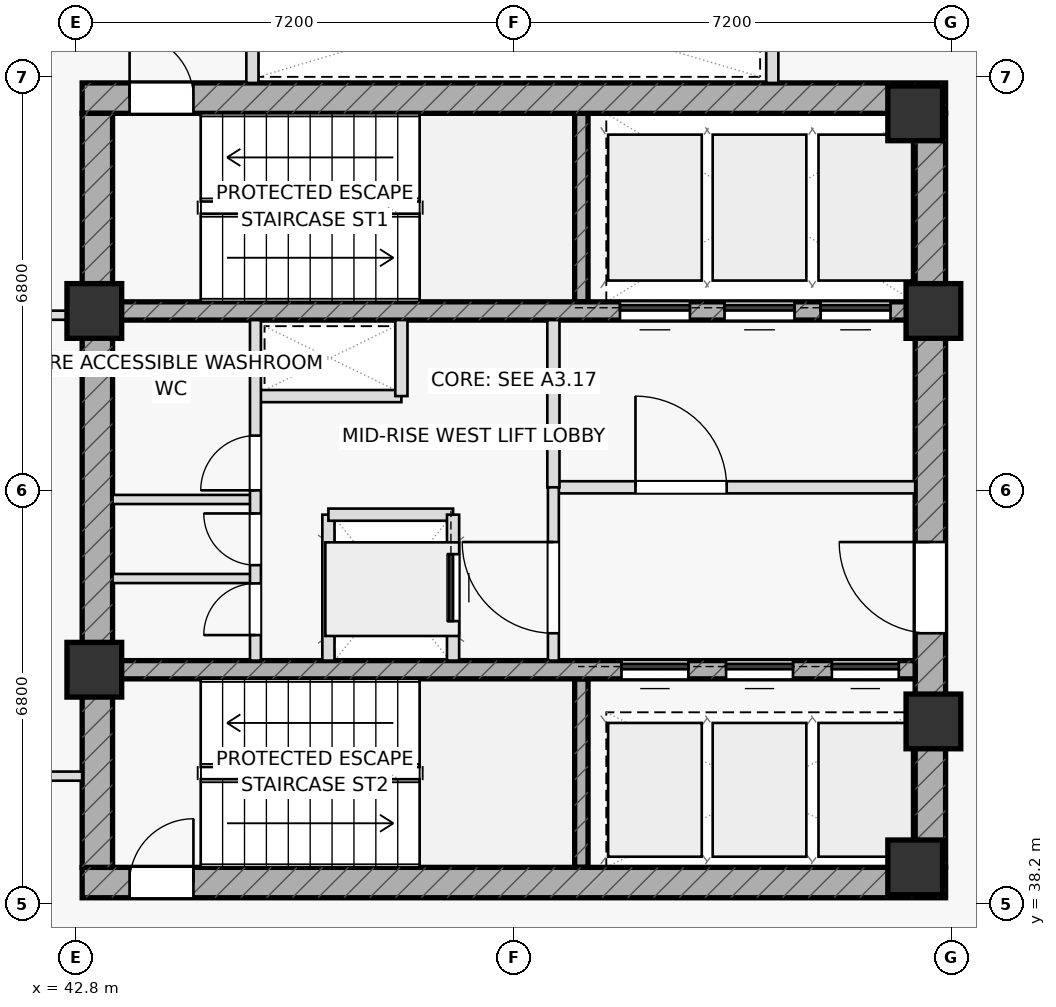
"""IFC4 building model, lengths in metres.
Left out: names, types, materials, properties, quantities, classifications, styles, units other than length and angle.
Written with IfcOpenShell. Run it as: python <this file> out.ifc"""

import sys

from ifc_helpers import new_model, si_unit, direction, frame, frame_2d, origin, origin_2d, place, context, subcontext, project, spatial, rectangle, extrude, element, fill, save


model = new_model("IFC4")
c1 = context("Model", 3, precision=1e-05, world=origin(), true_north=direction((0.0, 1.0)))
c2 = subcontext(c1, "Body", "Model", "MODEL_VIEW")
j1 = project(units=[si_unit("LENGTHUNIT", "METRE"), si_unit("PLANEANGLEUNIT", "RADIAN")], contexts=[c1])
p1 = place(None, origin())
s1 = spatial("IfcSite", under=j1, at=p1, CompositionType="ELEMENT")
p2 = place(p1, origin())
s2 = spatial("IfcBuilding", under=s1, at=p2, CompositionType="ELEMENT")
p3 = place(p2, frame((0.0, 0.0, 196.45)))
s3 = spatial("IfcBuildingStorey", under=s2, at=p3, CompositionType="ELEMENT", Elevation=196.45)
for number, where, z_axis, x_axis in (
    (1, (51.11, 48.1, 0.0), (0.0, 0.0, 1.0), (0.0, 1.0, 0.0)),
    (2, (51.11, 38.8, 0.0), (0.0, 0.0, 1.0), (0.0, 1.0, 0.0)),
):
    element("IfcWall", number, at=place(p3, frame(where, z_axis=z_axis, x_axis=x_axis)), inside=s3, PredefinedType="SHEAR", context=c2, shape_type="SweptSolid", body=[
        extrude(rectangle(XDim=3.1, YDim=0.22, at=frame_2d((1.55, 0.0))), origin(), (0.0, 0.0, 1.0), 3.55),
    ])
p4 = place(p3, frame((42.9, 51.45, 0.0), z_axis=(0.0, 0.0, 1.0), x_axis=(1.0, 0.0, 0.0)))
e3 = element("IfcWall", 3, at=p4, inside=s3, PredefinedType="SHEAR", context=c2, shape_type="SweptSolid", body=[
    extrude(rectangle(XDim=14.2, YDim=0.5, at=frame_2d((7.1, 0.0))), origin(), (0.0, 0.0, 1.0), 3.55),
])
p5 = place(p4, frame((0.78, 0.0, 0.0)))
e4 = element("IfcOpeningElement", 4, at=p5, cuts=e3, PredefinedType="OPENING", context=c2, shape_type="SweptSolid", body=[
    extrude(rectangle(XDim=1.05, YDim=2.2, at=frame_2d((0.525, 1.1))), frame((0.0, 0.26, 0.0), z_axis=(0.0, -1.0, 0.0), x_axis=(1.0, 0.0, 0.0)), (0.0, 0.0, 1.0), 0.52),
])
p6 = place(p3, frame((42.9, 38.55, 0.0), z_axis=(0.0, 0.0, 1.0), x_axis=(1.0, 0.0, 0.0)))
e5 = element("IfcWall", 5, at=p6, inside=s3, PredefinedType="SHEAR", context=c2, shape_type="SweptSolid", body=[
    extrude(rectangle(XDim=14.2, YDim=0.5, at=frame_2d((7.1, 0.0))), origin(), (0.0, 0.0, 1.0), 3.55),
])
p7 = place(p6, frame((0.78, 0.0, 0.0)))
e6 = element("IfcOpeningElement", 6, at=p7, cuts=e5, PredefinedType="OPENING", context=c2, shape_type="SweptSolid", body=[
    extrude(rectangle(XDim=1.05, YDim=2.2, at=frame_2d((0.525, 1.1))), frame((0.0, 0.26, 0.0), z_axis=(0.0, -1.0, 0.0), x_axis=(1.0, 0.0, 0.0)), (0.0, 0.0, 1.0), 0.52),
])
p8 = place(p3, frame((43.15, 38.8, 0.0), z_axis=(0.0, 0.0, 1.0), x_axis=(0.0, 1.0, 0.0)))
e7 = element("IfcWall", 7, at=p8, inside=s3, PredefinedType="SHEAR", context=c2, shape_type="SweptSolid", body=[
    extrude(rectangle(XDim=12.4, YDim=0.5, at=frame_2d((6.2, 0.0))), origin(), (0.0, 0.0, 1.0), 3.55),
])
p9 = place(p3, frame((56.85, 38.8, 0.0), z_axis=(0.0, 0.0, 1.0), x_axis=(0.0, 1.0, 0.0)))
e8 = element("IfcWall", 8, at=p9, inside=s3, PredefinedType="SHEAR", context=c2, shape_type="SweptSolid", body=[
    extrude(rectangle(XDim=12.4, YDim=0.5, at=frame_2d((6.2, 0.0))), origin(), (0.0, 0.0, 1.0), 3.55),
])
p10 = place(p9, frame((3.85, 0.0, 0.0)))
e9 = element("IfcOpeningElement", 9, at=p10, cuts=e8, PredefinedType="OPENING", context=c2, shape_type="SweptSolid", body=[
    extrude(rectangle(XDim=1.5, YDim=2.2, at=frame_2d((0.75, 1.1))), frame((0.0, 0.26, 0.0), z_axis=(0.0, -1.0, 0.0), x_axis=(1.0, 0.0, 0.0)), (0.0, 0.0, 1.0), 0.52),
])
p11 = place(p3, frame((43.4, 47.95, 0.0), z_axis=(0.0, 0.0, 1.0), x_axis=(1.0, 0.0, 0.0)))
e10 = element("IfcWall", 10, at=p11, inside=s3, PredefinedType="SHEAR", context=c2, shape_type="SweptSolid", body=[
    extrude(rectangle(XDim=13.2, YDim=0.3, at=frame_2d((6.6, 0.0))), origin(), (0.0, 0.0, 1.0), 3.55),
])
p12 = place(p11, frame((8.345, 0.0, 0.0)))
e11 = element("IfcOpeningElement", 11, at=p12, cuts=e10, PredefinedType="OPENING", context=c2, shape_type="SweptSolid", body=[
    extrude(rectangle(XDim=1.15, YDim=2.2, at=frame_2d((0.575, 1.1))), frame((0.0, 0.16, 0.0), z_axis=(0.0, -1.0, 0.0), x_axis=(1.0, 0.0, 0.0)), (0.0, 0.0, 1.0), 0.32),
])
p13 = place(p11, frame((10.065, 0.0, 0.0)))
e12 = element("IfcOpeningElement", 12, at=p13, cuts=e10, PredefinedType="OPENING", context=c2, shape_type="SweptSolid", body=[
    extrude(rectangle(XDim=1.15, YDim=2.2, at=frame_2d((0.575, 1.1))), frame((0.0, 0.16, 0.0), z_axis=(0.0, -1.0, 0.0), x_axis=(1.0, 0.0, 0.0)), (0.0, 0.0, 1.0), 0.32),
])
p14 = place(p11, frame((11.645, 0.0, 0.0)))
e13 = element("IfcOpeningElement", 13, at=p14, cuts=e10, PredefinedType="OPENING", context=c2, shape_type="SweptSolid", body=[
    extrude(rectangle(XDim=1.15, YDim=2.2, at=frame_2d((0.575, 1.1))), frame((0.0, 0.16, 0.0), z_axis=(0.0, -1.0, 0.0), x_axis=(1.0, 0.0, 0.0)), (0.0, 0.0, 1.0), 0.32),
])
p15 = place(p3, frame((43.4, 42.05, 0.0), z_axis=(0.0, 0.0, 1.0), x_axis=(1.0, 0.0, 0.0)))
e14 = element("IfcWall", 14, at=p15, inside=s3, PredefinedType="SHEAR", context=c2, shape_type="SweptSolid", body=[
    extrude(rectangle(XDim=13.2, YDim=0.3, at=frame_2d((6.6, 0.0))), origin(), (0.0, 0.0, 1.0), 3.55),
])
p16 = place(p15, frame((8.37, 0.0, 0.0)))
e15 = element("IfcOpeningElement", 15, at=p16, cuts=e14, PredefinedType="OPENING", context=c2, shape_type="SweptSolid", body=[
    extrude(rectangle(XDim=1.1, YDim=2.15, at=frame_2d((0.55, 1.075))), frame((0.0, 0.16, 0.0), z_axis=(0.0, -1.0, 0.0), x_axis=(1.0, 0.0, 0.0)), (0.0, 0.0, 1.0), 0.32),
])
p17 = place(p15, frame((10.09, 0.0, 0.0)))
e16 = element("IfcOpeningElement", 16, at=p17, cuts=e14, PredefinedType="OPENING", context=c2, shape_type="SweptSolid", body=[
    extrude(rectangle(XDim=1.1, YDim=2.15, at=frame_2d((0.55, 1.075))), frame((0.0, 0.16, 0.0), z_axis=(0.0, -1.0, 0.0), x_axis=(1.0, 0.0, 0.0)), (0.0, 0.0, 1.0), 0.32),
])
p18 = place(p15, frame((11.83, 0.0, 0.0)))
e17 = element("IfcOpeningElement", 17, at=p18, cuts=e14, PredefinedType="OPENING", context=c2, shape_type="SweptSolid", body=[
    extrude(rectangle(XDim=1.1, YDim=2.15, at=frame_2d((0.55, 1.075))), frame((0.0, 0.16, 0.0), z_axis=(0.0, -1.0, 0.0), x_axis=(1.0, 0.0, 0.0)), (0.0, 0.0, 1.0), 0.32),
])
for number, where, z_axis, x_axis in (
    (18, (43.1, 47.95, 0.0), (0.0, 0.0, 1.0), (1.0, 0.0, 0.0)),
    (19, (56.9, 47.95, 0.0), (0.0, 0.0, 1.0), (1.0, 0.0, 0.0)),
    (20, (56.6, 51.2, 0.0), (0.0, 0.0, 1.0), (1.0, 0.0, 0.0)),
    (21, (43.1, 42.05, 0.0), (0.0, 0.0, 1.0), (1.0, 0.0, 0.0)),
    (22, (56.9, 41.2, 0.0), (0.0, 0.0, 1.0), (1.0, 0.0, 0.0)),
    (23, (56.6, 38.8, 0.0), (0.0, 0.0, 1.0), (1.0, 0.0, 0.0)),
):
    element("IfcColumn", number, at=place(p3, frame(where, z_axis=z_axis, x_axis=x_axis)), inside=s3, PredefinedType="COLUMN", context=c2, shape_type="SweptSolid", body=[
        extrude(rectangle(XDim=0.9, YDim=0.9, at=origin_2d()), origin(), (0.0, 0.0, 1.0), 3.55),
    ])
for number, where, z_axis, x_axis in (
    (24, (45.7, 51.7, 0.0), (0.0, 0.0, 1.0), (0.0, 1.0, 0.0)),
    (25, (54.25, 51.7, 0.0), (0.0, 0.0, 1.0), (0.0, 1.0, 0.0)),
):
    element("IfcWall", number, at=place(p3, frame(where, z_axis=z_axis, x_axis=x_axis)), inside=s3, PredefinedType="PARTITIONING", context=c2, shape_type="SweptSolid", body=[
        extrude(rectangle(XDim=2.6, YDim=0.2, at=frame_2d((1.3, 0.0))), origin(), (0.0, 0.0, 1.0), 3.55),
    ])
p19 = place(p3, frame((45.75, 46.55, 0.0), z_axis=(0.0, 0.0, 1.0), x_axis=(1.0, 0.0, 0.0)))
e26 = element("IfcWall", 26, at=p19, inside=s3, PredefinedType="PARTITIONING", context=c2, shape_type="SweptSolid", body=[
    extrude(rectangle(XDim=2.4, YDim=0.2, at=frame_2d((1.2, 0.0))), origin(), (0.0, 0.0, 1.0), 3.55),
])
p20 = place(p3, frame((48.15, 46.55, 0.0), z_axis=(0.0, 0.0, 1.0), x_axis=(0.0, 1.0, 0.0)))
e27 = element("IfcWall", 27, at=p20, inside=s3, PredefinedType="PARTITIONING", context=c2, shape_type="SweptSolid", body=[
    extrude(rectangle(XDim=1.25, YDim=0.2, at=frame_2d((0.625, 0.0))), origin(), (0.0, 0.0, 1.0), 3.55),
])
p21 = place(p3, frame((46.95, 42.2, 0.0), z_axis=(0.0, 0.0, 1.0), x_axis=(0.0, 1.0, 0.0)))
e28 = element("IfcWall", 28, at=p21, inside=s3, PredefinedType="PARTITIONING", context=c2, shape_type="SweptSolid", body=[
    extrude(rectangle(XDim=2.4, YDim=0.2, at=frame_2d((1.2, 0.0))), origin(), (0.0, 0.0, 1.0), 3.55),
])
p22 = place(p3, frame((46.95, 44.6, 0.0), z_axis=(0.0, 0.0, 1.0), x_axis=(1.0, 0.0, 0.0)))
e29 = element("IfcWall", 29, at=p22, inside=s3, PredefinedType="PARTITIONING", context=c2, shape_type="SweptSolid", body=[
    extrude(rectangle(XDim=2.05, YDim=0.2, at=frame_2d((1.025, 0.0))), origin(), (0.0, 0.0, 1.0), 3.55),
])
p23 = place(p3, frame((50.65, 45.05, 0.0), z_axis=(0.0, 0.0, 1.0), x_axis=(1.0, 0.0, 0.0)))
e30 = element("IfcWall", 30, at=p23, inside=s3, PredefinedType="PARTITIONING", context=c2, shape_type="SweptSolid", body=[
    extrude(rectangle(XDim=5.95, YDim=0.2, at=frame_2d((2.975, 0.0))), origin(), (0.0, 0.0, 1.0), 3.55),
])
p24 = place(p23, frame((1.35, 0.0, 0.0)))
e31 = element("IfcOpeningElement", 31, at=p24, cuts=e30, PredefinedType="OPENING", context=c2, shape_type="SweptSolid", body=[
    extrude(rectangle(XDim=1.5, YDim=2.2, at=frame_2d((0.75, 1.1))), frame((0.0, 0.11, 0.0), z_axis=(0.0, -1.0, 0.0), x_axis=(1.0, 0.0, 0.0)), (0.0, 0.0, 1.0), 0.22),
])
p25 = place(p3, frame((50.65, 45.05, 0.0), z_axis=(0.0, 0.0, 1.0), x_axis=(0.0, 1.0, 0.0)))
e32 = element("IfcWall", 32, at=p25, inside=s3, PredefinedType="PARTITIONING", context=c2, shape_type="SweptSolid", body=[
    extrude(rectangle(XDim=2.75, YDim=0.2, at=frame_2d((1.375, 0.0))), origin(), (0.0, 0.0, 1.0), 3.55),
])
p26 = place(p3, frame((50.65, 42.2, 0.0), z_axis=(0.0, 0.0, 1.0), x_axis=(0.0, 1.0, 0.0)))
e33 = element("IfcWall", 33, at=p26, inside=s3, PredefinedType="PARTITIONING", context=c2, shape_type="SweptSolid", body=[
    extrude(rectangle(XDim=2.85, YDim=0.18, at=frame_2d((1.425, 0.0))), origin(), (0.0, 0.0, 1.0), 3.55),
])
p27 = place(p26, frame((0.45, 0.0, 0.0)))
e34 = element("IfcOpeningElement", 34, at=p27, cuts=e33, PredefinedType="OPENING", context=c2, shape_type="SweptSolid", body=[
    extrude(rectangle(XDim=1.5, YDim=2.2, at=frame_2d((0.75, 1.1))), frame((0.0, 0.1, 0.0), z_axis=(0.0, -1.0, 0.0), x_axis=(1.0, 0.0, 0.0)), (0.0, 0.0, 1.0), 0.2),
])
for number, where, z_axis, x_axis in (
    (35, (43.4, 43.55, 0.0), (0.0, 0.0, 1.0), (1.0, 0.0, 0.0)),
    (36, (43.4, 44.85, 0.0), (0.0, 0.0, 1.0), (1.0, 0.0, 0.0)),
):
    element("IfcWall", number, at=place(p3, frame(where, z_axis=z_axis, x_axis=x_axis)), inside=s3, PredefinedType="PARTITIONING", context=c2, shape_type="SweptSolid", body=[
        extrude(rectangle(XDim=2.35, YDim=0.15, at=frame_2d((1.175, 0.0))), origin(), (0.0, 0.0, 1.0), 3.55),
    ])
p28 = place(p3, frame((45.75, 42.2, 0.0), z_axis=(0.0, 0.0, 1.0), x_axis=(0.0, 1.0, 0.0)))
e37 = element("IfcWall", 37, at=p28, inside=s3, PredefinedType="PARTITIONING", context=c2, shape_type="SweptSolid", body=[
    extrude(rectangle(XDim=5.6, YDim=0.18, at=frame_2d((2.8, 0.0))), origin(), (0.0, 0.0, 1.0), 3.55),
])
p29 = place(p28, frame((0.42, 0.0, 0.0)))
e38 = element("IfcOpeningElement", 38, at=p29, cuts=e37, PredefinedType="OPENING", context=c2, shape_type="SweptSolid", body=[
    extrude(rectangle(XDim=0.85, YDim=2.05, at=frame_2d((0.425, 1.025))), frame((0.0, 0.1, 0.0), z_axis=(0.0, -1.0, 0.0), x_axis=(1.0, 0.0, 0.0)), (0.0, 0.0, 1.0), 0.2),
])
p30 = place(p28, frame((1.57, 0.0, 0.0)))
e39 = element("IfcOpeningElement", 39, at=p30, cuts=e37, PredefinedType="OPENING", context=c2, shape_type="SweptSolid", body=[
    extrude(rectangle(XDim=0.85, YDim=2.05, at=frame_2d((0.425, 1.025))), frame((0.0, 0.1, 0.0), z_axis=(0.0, -1.0, 0.0), x_axis=(1.0, 0.0, 0.0)), (0.0, 0.0, 1.0), 0.2),
])
p31 = place(p28, frame((2.8, 0.0, 0.0)))
e40 = element("IfcOpeningElement", 40, at=p31, cuts=e37, PredefinedType="OPENING", context=c2, shape_type="SweptSolid", body=[
    extrude(rectangle(XDim=0.9, YDim=2.05, at=frame_2d((0.45, 1.025))), frame((0.0, 0.1, 0.0), z_axis=(0.0, -1.0, 0.0), x_axis=(1.0, 0.0, 0.0)), (0.0, 0.0, 1.0), 0.2),
])
p32 = place(p3, frame((37.14, 40.3, 0.0), z_axis=(0.0, 0.0, 1.0), x_axis=(1.0, 0.0, 0.0)))
e41 = element("IfcWall", 41, at=p32, inside=s3, PredefinedType="PARTITIONING", context=c2, shape_type="SweptSolid", body=[
    extrude(rectangle(XDim=5.76, YDim=0.15, at=frame_2d((2.88, 0.0))), origin(), (0.0, 0.0, 1.0), 3.55),
])
p33 = place(p32, frame((3.21, 0.0, 0.0)))
e42 = element("IfcOpeningElement", 42, at=p33, cuts=e41, PredefinedType="OPENING", context=c2, shape_type="SweptSolid", body=[
    extrude(rectangle(XDim=0.95, YDim=2.05, at=frame_2d((0.475, 1.025))), frame((0.0, 0.085, 0.0), z_axis=(0.0, -1.0, 0.0), x_axis=(1.0, 0.0, 0.0)), (0.0, 0.0, 1.0), 0.17),
])
p34 = place(p3, frame((37.14, 47.88, 0.0), z_axis=(0.0, 0.0, 1.0), x_axis=(1.0, 0.0, 0.0)))
e43 = element("IfcWall", 43, at=p34, inside=s3, PredefinedType="PARTITIONING", context=c2, shape_type="SweptSolid", body=[
    extrude(rectangle(XDim=5.76, YDim=0.15, at=frame_2d((2.88, 0.0))), origin(), (0.0, 0.0, 1.0), 2.935),
])
p35 = place(p3, frame((49.0, 42.2, 0.0), z_axis=(0.0, 0.0, 1.0), x_axis=(0.0, 1.0, 0.0)))
e44 = element("IfcWall", 44, at=p35, inside=s3, PredefinedType="PARTITIONING", context=c2, shape_type="SweptSolid", body=[
    extrude(rectangle(XDim=2.4, YDim=0.2, at=frame_2d((1.2, 0.0))), origin(), (0.0, 0.0, 1.0), 3.55),
])
p36 = place(p35, frame((0.65, 0.0, 0.0)))
e45 = element("IfcOpeningElement", 45, at=p36, cuts=e44, PredefinedType="OPENING", context=c2, shape_type="SweptSolid", body=[
    extrude(rectangle(XDim=1.1, YDim=2.15, at=frame_2d((0.55, 1.075))), frame((0.0, 0.11, 0.0), z_axis=(0.0, -1.0, 0.0), x_axis=(1.0, 0.0, 0.0)), (0.0, 0.0, 1.0), 0.22),
])
p37 = place(p5, origin())
e46 = element("IfcDoor", 46, at=p37, inside=s3, OperationType="SINGLE_SWING_LEFT", PredefinedType="DOOR", context=c2, shape_type="SweptSolid", body=[
    extrude(rectangle(XDim=1.05, YDim=2.2, at=frame_2d((0.525, 1.1))), frame((0.0, 0.025, 0.0), z_axis=(0.0, -1.0, 0.0), x_axis=(1.0, 0.0, 0.0)), (0.0, 0.0, 1.0), 0.05),
])
fill(e4, e46)
p38 = place(p7, origin())
e47 = element("IfcDoor", 47, at=p38, inside=s3, OperationType="SINGLE_SWING_RIGHT", PredefinedType="DOOR", context=c2, shape_type="SweptSolid", body=[
    extrude(rectangle(XDim=1.05, YDim=2.2, at=frame_2d((0.525, 1.1))), frame((0.0, 0.025, 0.0), z_axis=(0.0, -1.0, 0.0), x_axis=(1.0, 0.0, 0.0)), (0.0, 0.0, 1.0), 0.05),
])
fill(e6, e47)
p39 = place(p10, origin())
e48 = element("IfcDoor", 48, at=p39, inside=s3, OperationType="SINGLE_SWING_RIGHT", PredefinedType="DOOR", context=c2, shape_type="SweptSolid", body=[
    extrude(rectangle(XDim=1.5, YDim=2.2, at=frame_2d((0.75, 1.1))), frame((0.0, 0.025, 0.0), z_axis=(0.0, -1.0, 0.0), x_axis=(1.0, 0.0, 0.0)), (0.0, 0.0, 1.0), 0.05),
])
fill(e9, e48)
p40 = place(p24, origin())
e49 = element("IfcDoor", 49, at=p40, inside=s3, OperationType="SINGLE_SWING_LEFT", PredefinedType="DOOR", context=c2, shape_type="SweptSolid", body=[
    extrude(rectangle(XDim=1.5, YDim=2.2, at=frame_2d((0.75, 1.1))), frame((0.0, 0.025, 0.0), z_axis=(0.0, -1.0, 0.0), x_axis=(1.0, 0.0, 0.0)), (0.0, 0.0, 1.0), 0.05),
])
fill(e31, e49)
p41 = place(p27, origin())
e50 = element("IfcDoor", 50, at=p41, inside=s3, OperationType="SINGLE_SWING_RIGHT", PredefinedType="DOOR", context=c2, shape_type="SweptSolid", body=[
    extrude(rectangle(XDim=1.5, YDim=2.2, at=frame_2d((0.75, 1.1))), frame((0.0, 0.025, 0.0), z_axis=(0.0, -1.0, 0.0), x_axis=(1.0, 0.0, 0.0)), (0.0, 0.0, 1.0), 0.05),
])
fill(e34, e50)
p42 = place(p29, origin())
e51 = element("IfcDoor", 51, at=p42, inside=s3, OperationType="SINGLE_SWING_LEFT", PredefinedType="DOOR", context=c2, shape_type="SweptSolid", body=[
    extrude(rectangle(XDim=0.85, YDim=2.05, at=frame_2d((0.425, 1.025))), frame((0.0, 0.025, 0.0), z_axis=(0.0, -1.0, 0.0), x_axis=(1.0, 0.0, 0.0)), (0.0, 0.0, 1.0), 0.05),
])
fill(e38, e51)
p43 = place(p30, origin())
e52 = element("IfcDoor", 52, at=p43, inside=s3, OperationType="SINGLE_SWING_RIGHT", PredefinedType="DOOR", context=c2, shape_type="SweptSolid", body=[
    extrude(rectangle(XDim=0.85, YDim=2.05, at=frame_2d((0.425, 1.025))), frame((0.0, 0.025, 0.0), z_axis=(0.0, -1.0, 0.0), x_axis=(1.0, 0.0, 0.0)), (0.0, 0.0, 1.0), 0.05),
])
fill(e39, e52)
p44 = place(p31, origin())
e53 = element("IfcDoor", 53, at=p44, inside=s3, OperationType="SINGLE_SWING_LEFT", PredefinedType="DOOR", context=c2, shape_type="SweptSolid", body=[
    extrude(rectangle(XDim=0.9, YDim=2.05, at=frame_2d((0.45, 1.025))), frame((0.0, 0.025, 0.0), z_axis=(0.0, -1.0, 0.0), x_axis=(1.0, 0.0, 0.0)), (0.0, 0.0, 1.0), 0.05),
])
fill(e40, e53)
p45 = place(p12, origin())
e54 = element("IfcDoor", 54, at=p45, inside=s3, OperationType="SLIDING_TO_LEFT", PredefinedType="DOOR", context=c2, shape_type="SweptSolid", body=[
    extrude(rectangle(XDim=1.15, YDim=2.2, at=frame_2d((0.575, 1.1))), frame((0.0, 0.025, 0.0), z_axis=(0.0, -1.0, 0.0), x_axis=(1.0, 0.0, 0.0)), (0.0, 0.0, 1.0), 0.05),
])
fill(e11, e54)
p46 = place(p13, origin())
e55 = element("IfcDoor", 55, at=p46, inside=s3, OperationType="SLIDING_TO_LEFT", PredefinedType="DOOR", context=c2, shape_type="SweptSolid", body=[
    extrude(rectangle(XDim=1.15, YDim=2.2, at=frame_2d((0.575, 1.1))), frame((0.0, 0.025, 0.0), z_axis=(0.0, -1.0, 0.0), x_axis=(1.0, 0.0, 0.0)), (0.0, 0.0, 1.0), 0.05),
])
fill(e12, e55)
p47 = place(p14, origin())
e56 = element("IfcDoor", 56, at=p47, inside=s3, OperationType="SLIDING_TO_LEFT", PredefinedType="DOOR", context=c2, shape_type="SweptSolid", body=[
    extrude(rectangle(XDim=1.15, YDim=2.2, at=frame_2d((0.575, 1.1))), frame((0.0, 0.025, 0.0), z_axis=(0.0, -1.0, 0.0), x_axis=(1.0, 0.0, 0.0)), (0.0, 0.0, 1.0), 0.05),
])
fill(e13, e56)
p48 = place(p16, origin())
e57 = element("IfcDoor", 57, at=p48, inside=s3, OperationType="SLIDING_TO_LEFT", PredefinedType="DOOR", context=c2, shape_type="SweptSolid", body=[
    extrude(rectangle(XDim=1.1, YDim=2.15, at=frame_2d((0.55, 1.075))), frame((0.0, 0.025, 0.0), z_axis=(0.0, -1.0, 0.0), x_axis=(1.0, 0.0, 0.0)), (0.0, 0.0, 1.0), 0.05),
])
fill(e15, e57)
p49 = place(p17, origin())
e58 = element("IfcDoor", 58, at=p49, inside=s3, OperationType="SLIDING_TO_LEFT", PredefinedType="DOOR", context=c2, shape_type="SweptSolid", body=[
    extrude(rectangle(XDim=1.1, YDim=2.15, at=frame_2d((0.55, 1.075))), frame((0.0, 0.025, 0.0), z_axis=(0.0, -1.0, 0.0), x_axis=(1.0, 0.0, 0.0)), (0.0, 0.0, 1.0), 0.05),
])
fill(e16, e58)
p50 = place(p18, origin())
e59 = element("IfcDoor", 59, at=p50, inside=s3, OperationType="SLIDING_TO_LEFT", PredefinedType="DOOR", context=c2, shape_type="SweptSolid", body=[
    extrude(rectangle(XDim=1.1, YDim=2.15, at=frame_2d((0.55, 1.075))), frame((0.0, 0.025, 0.0), z_axis=(0.0, -1.0, 0.0), x_axis=(1.0, 0.0, 0.0)), (0.0, 0.0, 1.0), 0.05),
])
fill(e17, e59)
p51 = place(p36, origin())
e60 = element("IfcDoor", 60, at=p51, inside=s3, OperationType="SLIDING_TO_RIGHT", PredefinedType="DOOR", context=c2, shape_type="SweptSolid", body=[
    extrude(rectangle(XDim=1.1, YDim=2.15, at=frame_2d((0.55, 1.075))), frame((0.0, 0.025, 0.0), z_axis=(0.0, -1.0, 0.0), x_axis=(1.0, 0.0, 0.0)), (0.0, 0.0, 1.0), 0.05),
])
fill(e45, e60)
save(model, sys.argv[1])
